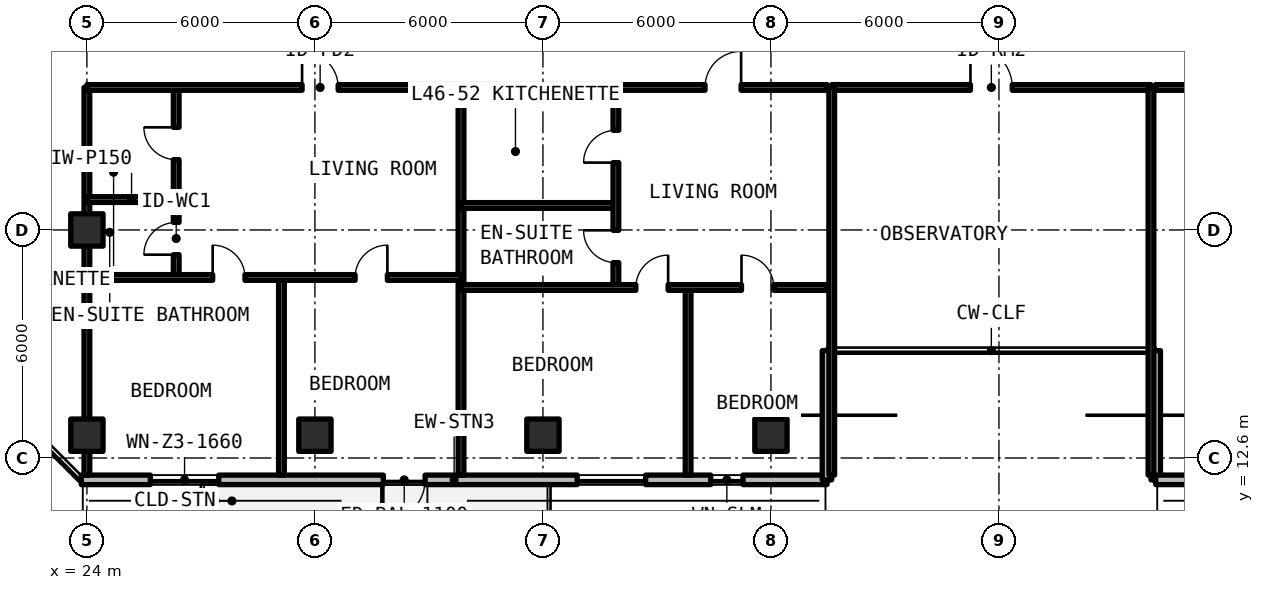
"""IFC4 building model, lengths in metres.
Left out: names, types, materials, properties, quantities, classifications, styles, units other than length and angle.
Written with IfcOpenShell. Run it as: python <this file> out.ifc"""

import sys

from ifc_helpers import new_model, si_unit, direction, frame, frame_2d, origin, origin_2d, place, context, subcontext, project, spatial, rectangle, extrude, element, fill, save


model = new_model("IFC4")
c1 = context("Model", 3, precision=1e-05, world=origin(), true_north=direction((0.0, 1.0)))
c2 = subcontext(c1, "Body", "Model", "MODEL_VIEW")
j1 = project(units=[si_unit("LENGTHUNIT", "METRE"), si_unit("PLANEANGLEUNIT", "RADIAN")], contexts=[c1])
p1 = place(None, origin())
s1 = spatial("IfcSite", under=j1, at=p1, CompositionType="ELEMENT")
p2 = place(p1, origin())
s2 = spatial("IfcBuilding", under=s1, at=p2, CompositionType="ELEMENT")
p3 = place(p2, frame((0.0, 0.0, 165.66)))
s3 = spatial("IfcBuildingStorey", under=s2, at=p3, CompositionType="ELEMENT", Elevation=165.66)
for number, where, z_axis, x_axis in (
    (1, (24.0, 18.6, 0.0), (0.0, 0.0, 1.0), (1.0, 0.0, 0.0)),
    (2, (24.0, 13.2, 0.0), (0.0, 0.0, 1.0), (1.0, 0.0, 0.0)),
    (3, (30.0, 13.2, 0.0), (0.0, 0.0, 1.0), (1.0, 0.0, 0.0)),
    (4, (36.0, 13.2, 0.0), (0.0, 0.0, 1.0), (1.0, 0.0, 0.0)),
    (5, (42.0, 13.2, 0.0), (0.0, 0.0, 1.0), (1.0, 0.0, 0.0)),
):
    element("IfcColumn", number, at=place(p3, frame(where, z_axis=z_axis, x_axis=x_axis)), inside=s3, PredefinedType="COLUMN", context=c2, shape_type="SweptSolid", body=[
        extrude(rectangle(XDim=0.85, YDim=0.85, at=origin_2d()), origin(), (0.0, 0.0, 1.0), 3.63),
    ])
p4 = place(p3, frame((23.852, 12.025, 0.0), z_axis=(0.0, 0.0, 1.0), x_axis=(1.0, 0.0, 0.0)))
e6 = element("IfcWall", 6, at=p4, inside=s3, PredefinedType="SOLIDWALL", context=c2, shape_type="SweptSolid", body=[
    extrude(rectangle(XDim=19.623, YDim=0.25, at=frame_2d((9.812, 0.0))), origin(), (0.0, 0.0, 1.0), 3.41),
])
p5 = place(p4, frame((7.948, 0.0, 0.0)))
e7 = element("IfcOpeningElement", 7, at=p5, cuts=e6, PredefinedType="OPENING", context=c2, shape_type="SweptSolid", body=[
    extrude(rectangle(XDim=1.1, YDim=2.15, at=frame_2d((0.55, 1.075))), frame((0.0, 0.135, 0.0), z_axis=(0.0, -1.0, 0.0), x_axis=(1.0, 0.0, 0.0)), (0.0, 0.0, 1.0), 0.27),
])
p6 = place(p4, frame((1.818, 0.0, 0.78)))
e8 = element("IfcOpeningElement", 8, at=p6, cuts=e6, PredefinedType="OPENING", context=c2, shape_type="SweptSolid", body=[
    extrude(rectangle(XDim=1.8, YDim=1.66, at=frame_2d((0.9, 0.83))), frame((0.0, 0.135, 0.0), z_axis=(0.0, -1.0, 0.0), x_axis=(1.0, 0.0, 0.0)), (0.0, 0.0, 1.0), 0.27),
])
p7 = place(p4, frame((13.051, 0.0, 0.78)))
e9 = element("IfcOpeningElement", 9, at=p7, cuts=e6, PredefinedType="OPENING", context=c2, shape_type="SweptSolid", body=[
    extrude(rectangle(XDim=1.8, YDim=1.66, at=frame_2d((0.9, 0.83))), frame((0.0, 0.135, 0.0), z_axis=(0.0, -1.0, 0.0), x_axis=(1.0, 0.0, 0.0)), (0.0, 0.0, 1.0), 0.27),
])
p8 = place(p4, frame((16.563, 0.0, 0.78)))
e10 = element("IfcOpeningElement", 10, at=p8, cuts=e6, PredefinedType="OPENING", context=c2, shape_type="SweptSolid", body=[
    extrude(rectangle(XDim=0.85, YDim=1.65, at=frame_2d((0.425, 0.825))), frame((0.0, 0.135, 0.0), z_axis=(0.0, -1.0, 0.0), x_axis=(1.0, 0.0, 0.0)), (0.0, 0.0, 1.0), 0.27),
])
for number, where, z_axis, x_axis in (
    (11, (43.475, 12.025, 0.0), (0.0, 0.0, 1.0), (0.0, 1.0, 0.0)),
    (12, (52.125, 15.425, 0.0), (0.0, 0.0, 1.0), (0.0, -1.0, 0.0)),
):
    element("IfcWall", number, at=place(p3, frame(where, z_axis=z_axis, x_axis=x_axis)), inside=s3, PredefinedType="SOLIDWALL", context=c2, shape_type="SweptSolid", body=[
        extrude(rectangle(XDim=3.4, YDim=0.25, at=frame_2d((1.7, 0.0))), origin(), (0.0, 0.0, 1.0), 3.41),
    ])
p9 = place(p3, frame((52.125, 12.025, 0.0), z_axis=(0.0, 0.0, 1.0), x_axis=(1.0, 0.0, 0.0)))
e13 = element("IfcWall", 13, at=p9, inside=s3, PredefinedType="SOLIDWALL", context=c2, shape_type="SweptSolid", body=[
    extrude(rectangle(XDim=43.623, YDim=0.25, at=frame_2d((21.812, 0.0))), origin(), (0.0, 0.0, 1.0), 3.41),
])
p10 = place(p9, frame((16.725, 0.0, 0.0)))
e14 = element("IfcOpeningElement", 14, at=p10, cuts=e13, PredefinedType="OPENING", context=c2, shape_type="SweptSolid", body=[
    extrude(rectangle(XDim=1.1, YDim=2.15, at=frame_2d((0.55, 1.075))), frame((0.0, 0.135, 0.0), z_axis=(0.0, -1.0, 0.0), x_axis=(1.0, 0.0, 0.0)), (0.0, 0.0, 1.0), 0.27),
])
p11 = place(p9, frame((27.575, 0.0, 0.0)))
e15 = element("IfcOpeningElement", 15, at=p11, cuts=e13, PredefinedType="OPENING", context=c2, shape_type="SweptSolid", body=[
    extrude(rectangle(XDim=1.1, YDim=2.15, at=frame_2d((0.55, 1.075))), frame((0.0, 0.135, 0.0), z_axis=(0.0, -1.0, 0.0), x_axis=(1.0, 0.0, 0.0)), (0.0, 0.0, 1.0), 0.27),
])
p12 = place(p9, frame((2.756, 0.0, 0.78)))
e16 = element("IfcOpeningElement", 16, at=p12, cuts=e13, PredefinedType="OPENING", context=c2, shape_type="SweptSolid", body=[
    extrude(rectangle(XDim=1.8, YDim=1.66, at=frame_2d((0.9, 0.83))), frame((0.0, 0.135, 0.0), z_axis=(0.0, -1.0, 0.0), x_axis=(1.0, 0.0, 0.0)), (0.0, 0.0, 1.0), 0.27),
])
p13 = place(p9, frame((8.776, 0.0, 0.78)))
e17 = element("IfcOpeningElement", 17, at=p13, cuts=e13, PredefinedType="OPENING", context=c2, shape_type="SweptSolid", body=[
    extrude(rectangle(XDim=1.8, YDim=1.66, at=frame_2d((0.9, 0.83))), frame((0.0, 0.135, 0.0), z_axis=(0.0, -1.0, 0.0), x_axis=(1.0, 0.0, 0.0)), (0.0, 0.0, 1.0), 0.27),
])
p14 = place(p9, frame((14.654, 0.0, 0.78)))
e18 = element("IfcOpeningElement", 18, at=p14, cuts=e13, PredefinedType="OPENING", context=c2, shape_type="SweptSolid", body=[
    extrude(rectangle(XDim=0.85, YDim=1.65, at=frame_2d((0.425, 0.825))), frame((0.0, 0.135, 0.0), z_axis=(0.0, -1.0, 0.0), x_axis=(1.0, 0.0, 0.0)), (0.0, 0.0, 1.0), 0.27),
])
p15 = place(p9, frame((23.159, 0.0, 0.78)))
e19 = element("IfcOpeningElement", 19, at=p15, cuts=e13, PredefinedType="OPENING", context=c2, shape_type="SweptSolid", body=[
    extrude(rectangle(XDim=1.8, YDim=1.66, at=frame_2d((0.9, 0.83))), frame((0.0, 0.135, 0.0), z_axis=(0.0, -1.0, 0.0), x_axis=(1.0, 0.0, 0.0)), (0.0, 0.0, 1.0), 0.27),
])
p16 = place(p9, frame((38.451, 0.0, 0.78)))
e20 = element("IfcOpeningElement", 20, at=p16, cuts=e13, PredefinedType="OPENING", context=c2, shape_type="SweptSolid", body=[
    extrude(rectangle(XDim=0.85, YDim=1.65, at=frame_2d((0.425, 0.825))), frame((0.0, 0.135, 0.0), z_axis=(0.0, -1.0, 0.0), x_axis=(1.0, 0.0, 0.0)), (0.0, 0.0, 1.0), 0.27),
])
p17 = place(p9, frame((40.725, 0.0, 0.78)))
e21 = element("IfcOpeningElement", 21, at=p17, cuts=e13, PredefinedType="OPENING", context=c2, shape_type="SweptSolid", body=[
    extrude(rectangle(XDim=1.8, YDim=1.66, at=frame_2d((0.9, 0.83))), frame((0.0, 0.135, 0.0), z_axis=(0.0, -1.0, 0.0), x_axis=(1.0, 0.0, 0.0)), (0.0, 0.0, 1.0), 0.27),
])
p18 = place(p3, frame((43.6, 22.35, 0.0), z_axis=(0.0, 0.0, 1.0), x_axis=(1.0, 0.0, 0.0)))
e22 = element("IfcWall", 22, at=p18, inside=s3, PredefinedType="SOLIDWALL", context=c2, shape_type="SweptSolid", body=[
    extrude(rectangle(XDim=8.4, YDim=0.15, at=frame_2d((4.2, 0.0))), origin(), (0.0, 0.0, 1.0), 2.63),
])
p19 = place(p18, frame((3.65, 0.0, 0.0)))
e23 = element("IfcOpeningElement", 23, at=p19, cuts=e22, PredefinedType="OPENING", context=c2, shape_type="SweptSolid", body=[
    extrude(rectangle(XDim=1.1, YDim=2.15, at=frame_2d((0.55, 1.075))), frame((0.0, 0.085, 0.0), z_axis=(0.0, -1.0, 0.0), x_axis=(1.0, 0.0, 0.0)), (0.0, 0.0, 1.0), 0.17),
])
for number, where, z_axis, x_axis in (
    (24, (43.6, 12.15, 0.0), (0.0, 0.0, 1.0), (0.0, 1.0, 0.0)),
    (25, (52.0, 12.15, 0.0), (0.0, 0.0, 1.0), (0.0, 1.0, 0.0)),
    (26, (24.0, 12.15, 0.0), (0.0, 0.0, 1.0), (0.0, 1.0, 0.0)),
    (27, (33.845, 12.15, 0.0), (0.0, 0.0, 1.0), (0.0, 1.0, 0.0)),
):
    element("IfcWall", number, at=place(p3, frame(where, z_axis=z_axis, x_axis=x_axis)), inside=s3, PredefinedType="SOLIDWALL", context=c2, shape_type="SweptSolid", body=[
        extrude(rectangle(XDim=10.2, YDim=0.15, at=frame_2d((5.1, 0.0))), origin(), (0.0, 0.0, 1.0), 2.63),
    ])
p20 = place(p3, frame((24.0, 19.4, 0.0), z_axis=(0.0, 0.0, 1.0), x_axis=(1.0, 0.0, 0.0)))
e28 = element("IfcWall", 28, at=p20, inside=s3, PredefinedType="PARTITIONING", context=c2, shape_type="SweptSolid", body=[
    extrude(rectangle(XDim=2.35, YDim=0.15, at=frame_2d((1.175, 0.0))), origin(), (0.0, 0.0, 1.0), 2.63),
])
p21 = place(p3, frame((26.35, 17.35, 0.0), z_axis=(0.0, 0.0, 1.0), x_axis=(0.0, 1.0, 0.0)))
e29 = element("IfcWall", 29, at=p21, inside=s3, PredefinedType="PARTITIONING", context=c2, shape_type="SweptSolid", body=[
    extrude(rectangle(XDim=5.0, YDim=0.15, at=frame_2d((2.5, 0.0))), origin(), (0.0, 0.0, 1.0), 2.63),
])
p22 = place(p21, frame((0.6, 0.0, 0.0)))
e30 = element("IfcOpeningElement", 30, at=p22, cuts=e29, PredefinedType="OPENING", context=c2, shape_type="SweptSolid", body=[
    extrude(rectangle(XDim=0.85, YDim=2.1, at=frame_2d((0.425, 1.05))), frame((0.0, 0.085, 0.0), z_axis=(0.0, -1.0, 0.0), x_axis=(1.0, 0.0, 0.0)), (0.0, 0.0, 1.0), 0.17),
])
p23 = place(p21, frame((3.1, 0.0, 0.0)))
e31 = element("IfcOpeningElement", 31, at=p23, cuts=e29, PredefinedType="OPENING", context=c2, shape_type="SweptSolid", body=[
    extrude(rectangle(XDim=0.85, YDim=2.1, at=frame_2d((0.425, 1.05))), frame((0.0, 0.085, 0.0), z_axis=(0.0, -1.0, 0.0), x_axis=(1.0, 0.0, 0.0)), (0.0, 0.0, 1.0), 0.17),
])
p24 = place(p3, frame((29.119, 12.15, 0.0), z_axis=(0.0, 0.0, 1.0), x_axis=(0.0, 1.0, 0.0)))
e32 = element("IfcWall", 32, at=p24, inside=s3, PredefinedType="PARTITIONING", context=c2, shape_type="SweptSolid", body=[
    extrude(rectangle(XDim=5.2, YDim=0.15, at=frame_2d((2.6, 0.0))), origin(), (0.0, 0.0, 1.0), 2.63),
])
p25 = place(p3, frame((24.0, 17.35, 0.0), z_axis=(0.0, 0.0, 1.0), x_axis=(1.0, 0.0, 0.0)))
e33 = element("IfcWall", 33, at=p25, inside=s3, PredefinedType="PARTITIONING", context=c2, shape_type="SweptSolid", body=[
    extrude(rectangle(XDim=9.845, YDim=0.15, at=frame_2d((4.922, 0.0))), origin(), (0.0, 0.0, 1.0), 2.63),
])
p26 = place(p25, frame((3.31, 0.0, 0.0)))
e34 = element("IfcOpeningElement", 34, at=p26, cuts=e33, PredefinedType="OPENING", context=c2, shape_type="SweptSolid", body=[
    extrude(rectangle(XDim=0.85, YDim=2.1, at=frame_2d((0.425, 1.05))), frame((0.0, 0.085, 0.0), z_axis=(0.0, -1.0, 0.0), x_axis=(1.0, 0.0, 0.0)), (0.0, 0.0, 1.0), 0.17),
])
p27 = place(p25, frame((7.057, 0.0, 0.0)))
e35 = element("IfcOpeningElement", 35, at=p27, cuts=e33, PredefinedType="OPENING", context=c2, shape_type="SweptSolid", body=[
    extrude(rectangle(XDim=0.85, YDim=2.1, at=frame_2d((0.425, 1.05))), frame((0.0, 0.085, 0.0), z_axis=(0.0, -1.0, 0.0), x_axis=(1.0, 0.0, 0.0)), (0.0, 0.0, 1.0), 0.17),
])
p28 = place(p3, frame((24.0, 22.35, 0.0), z_axis=(0.0, 0.0, 1.0), x_axis=(1.0, 0.0, 0.0)))
e36 = element("IfcWall", 36, at=p28, inside=s3, PredefinedType="SOLIDWALL", context=c2, shape_type="SweptSolid", body=[
    extrude(rectangle(XDim=9.845, YDim=0.15, at=frame_2d((4.922, 0.0))), origin(), (0.0, 0.0, 1.0), 2.63),
])
p29 = place(p28, frame((5.662, 0.0, 0.0)))
e37 = element("IfcOpeningElement", 37, at=p29, cuts=e36, PredefinedType="OPENING", context=c2, shape_type="SweptSolid", body=[
    extrude(rectangle(XDim=0.95, YDim=2.15, at=frame_2d((0.475, 1.075))), frame((0.0, 0.085, 0.0), z_axis=(0.0, -1.0, 0.0), x_axis=(1.0, 0.0, 0.0)), (0.0, 0.0, 1.0), 0.17),
])
p30 = place(p3, frame((33.845, 19.245, 0.0), z_axis=(0.0, 0.0, 1.0), x_axis=(1.0, 0.0, 0.0)))
e38 = element("IfcWall", 38, at=p30, inside=s3, PredefinedType="PARTITIONING", context=c2, shape_type="SweptSolid", body=[
    extrude(rectangle(XDim=4.075, YDim=0.15, at=frame_2d((2.038, 0.0))), origin(), (0.0, 0.0, 1.0), 2.63),
])
p31 = place(p3, frame((37.92, 17.087, 0.0), z_axis=(0.0, 0.0, 1.0), x_axis=(0.0, 1.0, 0.0)))
e39 = element("IfcWall", 39, at=p31, inside=s3, PredefinedType="PARTITIONING", context=c2, shape_type="SweptSolid", body=[
    extrude(rectangle(XDim=5.263, YDim=0.15, at=frame_2d((2.632, 0.0))), origin(), (0.0, 0.0, 1.0), 2.63),
])
p32 = place(p31, frame((0.654, 0.0, 0.0)))
e40 = element("IfcOpeningElement", 40, at=p32, cuts=e39, PredefinedType="OPENING", context=c2, shape_type="SweptSolid", body=[
    extrude(rectangle(XDim=0.85, YDim=2.1, at=frame_2d((0.425, 1.05))), frame((0.0, 0.085, 0.0), z_axis=(0.0, -1.0, 0.0), x_axis=(1.0, 0.0, 0.0)), (0.0, 0.0, 1.0), 0.17),
])
p33 = place(p31, frame((3.285, 0.0, 0.0)))
e41 = element("IfcOpeningElement", 41, at=p33, cuts=e39, PredefinedType="OPENING", context=c2, shape_type="SweptSolid", body=[
    extrude(rectangle(XDim=0.85, YDim=2.1, at=frame_2d((0.425, 1.05))), frame((0.0, 0.085, 0.0), z_axis=(0.0, -1.0, 0.0), x_axis=(1.0, 0.0, 0.0)), (0.0, 0.0, 1.0), 0.17),
])
p34 = place(p3, frame((39.82, 12.15, 0.0), z_axis=(0.0, 0.0, 1.0), x_axis=(0.0, 1.0, 0.0)))
e42 = element("IfcWall", 42, at=p34, inside=s3, PredefinedType="PARTITIONING", context=c2, shape_type="SweptSolid", body=[
    extrude(rectangle(XDim=4.937, YDim=0.15, at=frame_2d((2.469, 0.0))), origin(), (0.0, 0.0, 1.0), 2.63),
])
p35 = place(p3, frame((33.845, 17.087, 0.0), z_axis=(0.0, 0.0, 1.0), x_axis=(1.0, 0.0, 0.0)))
e43 = element("IfcWall", 43, at=p35, inside=s3, PredefinedType="PARTITIONING", context=c2, shape_type="SweptSolid", body=[
    extrude(rectangle(XDim=9.635, YDim=0.15, at=frame_2d((4.818, 0.0))), origin(), (0.0, 0.0, 1.0), 2.63),
])
p36 = place(p35, frame((4.6, 0.0, 0.0)))
e44 = element("IfcOpeningElement", 44, at=p36, cuts=e43, PredefinedType="OPENING", context=c2, shape_type="SweptSolid", body=[
    extrude(rectangle(XDim=0.85, YDim=2.1, at=frame_2d((0.425, 1.05))), frame((0.0, 0.085, 0.0), z_axis=(0.0, -1.0, 0.0), x_axis=(1.0, 0.0, 0.0)), (0.0, 0.0, 1.0), 0.17),
])
p37 = place(p35, frame((7.38, 0.0, 0.0)))
e45 = element("IfcOpeningElement", 45, at=p37, cuts=e43, PredefinedType="OPENING", context=c2, shape_type="SweptSolid", body=[
    extrude(rectangle(XDim=0.85, YDim=2.1, at=frame_2d((0.425, 1.05))), frame((0.0, 0.085, 0.0), z_axis=(0.0, -1.0, 0.0), x_axis=(1.0, 0.0, 0.0)), (0.0, 0.0, 1.0), 0.17),
])
p38 = place(p3, frame((33.845, 22.35, 0.0), z_axis=(0.0, 0.0, 1.0), x_axis=(1.0, 0.0, 0.0)))
e46 = element("IfcWall", 46, at=p38, inside=s3, PredefinedType="SOLIDWALL", context=c2, shape_type="SweptSolid", body=[
    extrude(rectangle(XDim=9.635, YDim=0.15, at=frame_2d((4.818, 0.0))), origin(), (0.0, 0.0, 1.0), 2.63),
])
p39 = place(p38, frame((6.42, 0.0, 0.0)))
e47 = element("IfcOpeningElement", 47, at=p39, cuts=e46, PredefinedType="OPENING", context=c2, shape_type="SweptSolid", body=[
    extrude(rectangle(XDim=0.95, YDim=2.15, at=frame_2d((0.475, 1.075))), frame((0.0, 0.085, 0.0), z_axis=(0.0, -1.0, 0.0), x_axis=(1.0, 0.0, 0.0)), (0.0, 0.0, 1.0), 0.17),
])
p40 = place(p3, frame((52.12, 22.35, 0.0), z_axis=(0.0, 0.0, 1.0), x_axis=(1.0, 0.0, 0.0)))
e48 = element("IfcWall", 48, at=p40, inside=s3, PredefinedType="SOLIDWALL", context=c2, shape_type="SweptSolid", body=[
    extrude(rectangle(XDim=5.721, YDim=0.15, at=frame_2d((2.86, 0.0))), origin(), (0.0, 0.0, 1.0), 2.63),
])
p41 = place(p40, frame((2.385, 0.0, 0.0)))
e49 = element("IfcOpeningElement", 49, at=p41, cuts=e48, PredefinedType="OPENING", context=c2, shape_type="SweptSolid", body=[
    extrude(rectangle(XDim=0.95, YDim=2.15, at=frame_2d((0.475, 1.075))), frame((0.0, 0.085, 0.0), z_axis=(0.0, -1.0, 0.0), x_axis=(1.0, 0.0, 0.0)), (0.0, 0.0, 1.0), 0.17),
])
p42 = place(p5, frame((1.1, 0.0, 0.0), z_axis=(0.0, 0.0, 1.0), x_axis=(-1.0, 0.0, 0.0)))
e50 = element("IfcDoor", 50, at=p42, inside=s3, OperationType="SINGLE_SWING_RIGHT", PredefinedType="DOOR", context=c2, shape_type="SweptSolid", body=[
    extrude(rectangle(XDim=1.1, YDim=2.15, at=frame_2d((0.55, 1.075))), frame((0.0, 0.025, 0.0), z_axis=(0.0, -1.0, 0.0), x_axis=(1.0, 0.0, 0.0)), (0.0, 0.0, 1.0), 0.05),
])
fill(e7, e50)
p43 = place(p6, origin())
e51 = element("IfcWindow", 51, at=p43, inside=s3, PartitioningType="SINGLE_PANEL", PredefinedType="WINDOW", context=c2, shape_type="SweptSolid", body=[
    extrude(rectangle(XDim=1.8, YDim=1.66, at=frame_2d((0.9, 0.83))), frame((0.0, 0.03, 0.0), z_axis=(0.0, -1.0, 0.0), x_axis=(1.0, 0.0, 0.0)), (0.0, 0.0, 1.0), 0.06),
])
fill(e8, e51)
p44 = place(p7, origin())
e52 = element("IfcWindow", 52, at=p44, inside=s3, PartitioningType="SINGLE_PANEL", PredefinedType="WINDOW", context=c2, shape_type="SweptSolid", body=[
    extrude(rectangle(XDim=1.8, YDim=1.66, at=frame_2d((0.9, 0.83))), frame((0.0, 0.03, 0.0), z_axis=(0.0, -1.0, 0.0), x_axis=(1.0, 0.0, 0.0)), (0.0, 0.0, 1.0), 0.06),
])
fill(e9, e52)
p45 = place(p8, origin())
e53 = element("IfcWindow", 53, at=p45, inside=s3, PartitioningType="SINGLE_PANEL", PredefinedType="WINDOW", context=c2, shape_type="SweptSolid", body=[
    extrude(rectangle(XDim=0.85, YDim=1.65, at=frame_2d((0.425, 0.825))), frame((0.0, 0.03, 0.0), z_axis=(0.0, -1.0, 0.0), x_axis=(1.0, 0.0, 0.0)), (0.0, 0.0, 1.0), 0.06),
])
fill(e10, e53)
p46 = place(p19, origin())
e54 = element("IfcDoor", 54, at=p46, inside=s3, OperationType="SINGLE_SWING_LEFT", PredefinedType="DOOR", context=c2, shape_type="SweptSolid", body=[
    extrude(rectangle(XDim=1.1, YDim=2.15, at=frame_2d((0.55, 1.075))), frame((0.0, 0.025, 0.0), z_axis=(0.0, -1.0, 0.0), x_axis=(1.0, 0.0, 0.0)), (0.0, 0.0, 1.0), 0.05),
])
fill(e23, e54)
p47 = place(p22, origin())
e55 = element("IfcDoor", 55, at=p47, inside=s3, OperationType="SINGLE_SWING_LEFT", PredefinedType="DOOR", context=c2, shape_type="SweptSolid", body=[
    extrude(rectangle(XDim=0.85, YDim=2.1, at=frame_2d((0.425, 1.05))), frame((0.0, 0.025, 0.0), z_axis=(0.0, -1.0, 0.0), x_axis=(1.0, 0.0, 0.0)), (0.0, 0.0, 1.0), 0.05),
])
fill(e30, e55)
p48 = place(p23, origin())
e56 = element("IfcDoor", 56, at=p48, inside=s3, OperationType="SINGLE_SWING_RIGHT", PredefinedType="DOOR", context=c2, shape_type="SweptSolid", body=[
    extrude(rectangle(XDim=0.85, YDim=2.1, at=frame_2d((0.425, 1.05))), frame((0.0, 0.025, 0.0), z_axis=(0.0, -1.0, 0.0), x_axis=(1.0, 0.0, 0.0)), (0.0, 0.0, 1.0), 0.05),
])
fill(e31, e56)
p49 = place(p26, origin())
e57 = element("IfcDoor", 57, at=p49, inside=s3, OperationType="SINGLE_SWING_LEFT", PredefinedType="DOOR", context=c2, shape_type="SweptSolid", body=[
    extrude(rectangle(XDim=0.85, YDim=2.1, at=frame_2d((0.425, 1.05))), frame((0.0, 0.025, 0.0), z_axis=(0.0, -1.0, 0.0), x_axis=(1.0, 0.0, 0.0)), (0.0, 0.0, 1.0), 0.05),
])
fill(e34, e57)
p50 = place(p27, origin())
e58 = element("IfcDoor", 58, at=p50, inside=s3, OperationType="SINGLE_SWING_RIGHT", PredefinedType="DOOR", context=c2, shape_type="SweptSolid", body=[
    extrude(rectangle(XDim=0.85, YDim=2.1, at=frame_2d((0.425, 1.05))), frame((0.0, 0.025, 0.0), z_axis=(0.0, -1.0, 0.0), x_axis=(1.0, 0.0, 0.0)), (0.0, 0.0, 1.0), 0.05),
])
fill(e35, e58)
p51 = place(p29, origin())
e59 = element("IfcDoor", 59, at=p51, inside=s3, OperationType="SINGLE_SWING_LEFT", PredefinedType="DOOR", context=c2, shape_type="SweptSolid", body=[
    extrude(rectangle(XDim=0.95, YDim=2.15, at=frame_2d((0.475, 1.075))), frame((0.0, 0.025, 0.0), z_axis=(0.0, -1.0, 0.0), x_axis=(1.0, 0.0, 0.0)), (0.0, 0.0, 1.0), 0.05),
])
fill(e37, e59)
p52 = place(p32, origin())
e60 = element("IfcDoor", 60, at=p52, inside=s3, OperationType="SINGLE_SWING_RIGHT", PredefinedType="DOOR", context=c2, shape_type="SweptSolid", body=[
    extrude(rectangle(XDim=0.85, YDim=2.1, at=frame_2d((0.425, 1.05))), frame((0.0, 0.025, 0.0), z_axis=(0.0, -1.0, 0.0), x_axis=(1.0, 0.0, 0.0)), (0.0, 0.0, 1.0), 0.05),
])
fill(e40, e60)
p53 = place(p33, origin())
e61 = element("IfcDoor", 61, at=p53, inside=s3, OperationType="SINGLE_SWING_LEFT", PredefinedType="DOOR", context=c2, shape_type="SweptSolid", body=[
    extrude(rectangle(XDim=0.85, YDim=2.1, at=frame_2d((0.425, 1.05))), frame((0.0, 0.025, 0.0), z_axis=(0.0, -1.0, 0.0), x_axis=(1.0, 0.0, 0.0)), (0.0, 0.0, 1.0), 0.05),
])
fill(e41, e61)
p54 = place(p36, origin())
e62 = element("IfcDoor", 62, at=p54, inside=s3, OperationType="SINGLE_SWING_RIGHT", PredefinedType="DOOR", context=c2, shape_type="SweptSolid", body=[
    extrude(rectangle(XDim=0.85, YDim=2.1, at=frame_2d((0.425, 1.05))), frame((0.0, 0.025, 0.0), z_axis=(0.0, -1.0, 0.0), x_axis=(1.0, 0.0, 0.0)), (0.0, 0.0, 1.0), 0.05),
])
fill(e44, e62)
p55 = place(p37, origin())
e63 = element("IfcDoor", 63, at=p55, inside=s3, OperationType="SINGLE_SWING_LEFT", PredefinedType="DOOR", context=c2, shape_type="SweptSolid", body=[
    extrude(rectangle(XDim=0.85, YDim=2.1, at=frame_2d((0.425, 1.05))), frame((0.0, 0.025, 0.0), z_axis=(0.0, -1.0, 0.0), x_axis=(1.0, 0.0, 0.0)), (0.0, 0.0, 1.0), 0.05),
])
fill(e45, e63)
p56 = place(p39, origin())
e64 = element("IfcDoor", 64, at=p56, inside=s3, OperationType="SINGLE_SWING_RIGHT", PredefinedType="DOOR", context=c2, shape_type="SweptSolid", body=[
    extrude(rectangle(XDim=0.95, YDim=2.15, at=frame_2d((0.475, 1.075))), frame((0.0, 0.025, 0.0), z_axis=(0.0, -1.0, 0.0), x_axis=(1.0, 0.0, 0.0)), (0.0, 0.0, 1.0), 0.05),
])
fill(e47, e64)
save(model, sys.argv[1])
